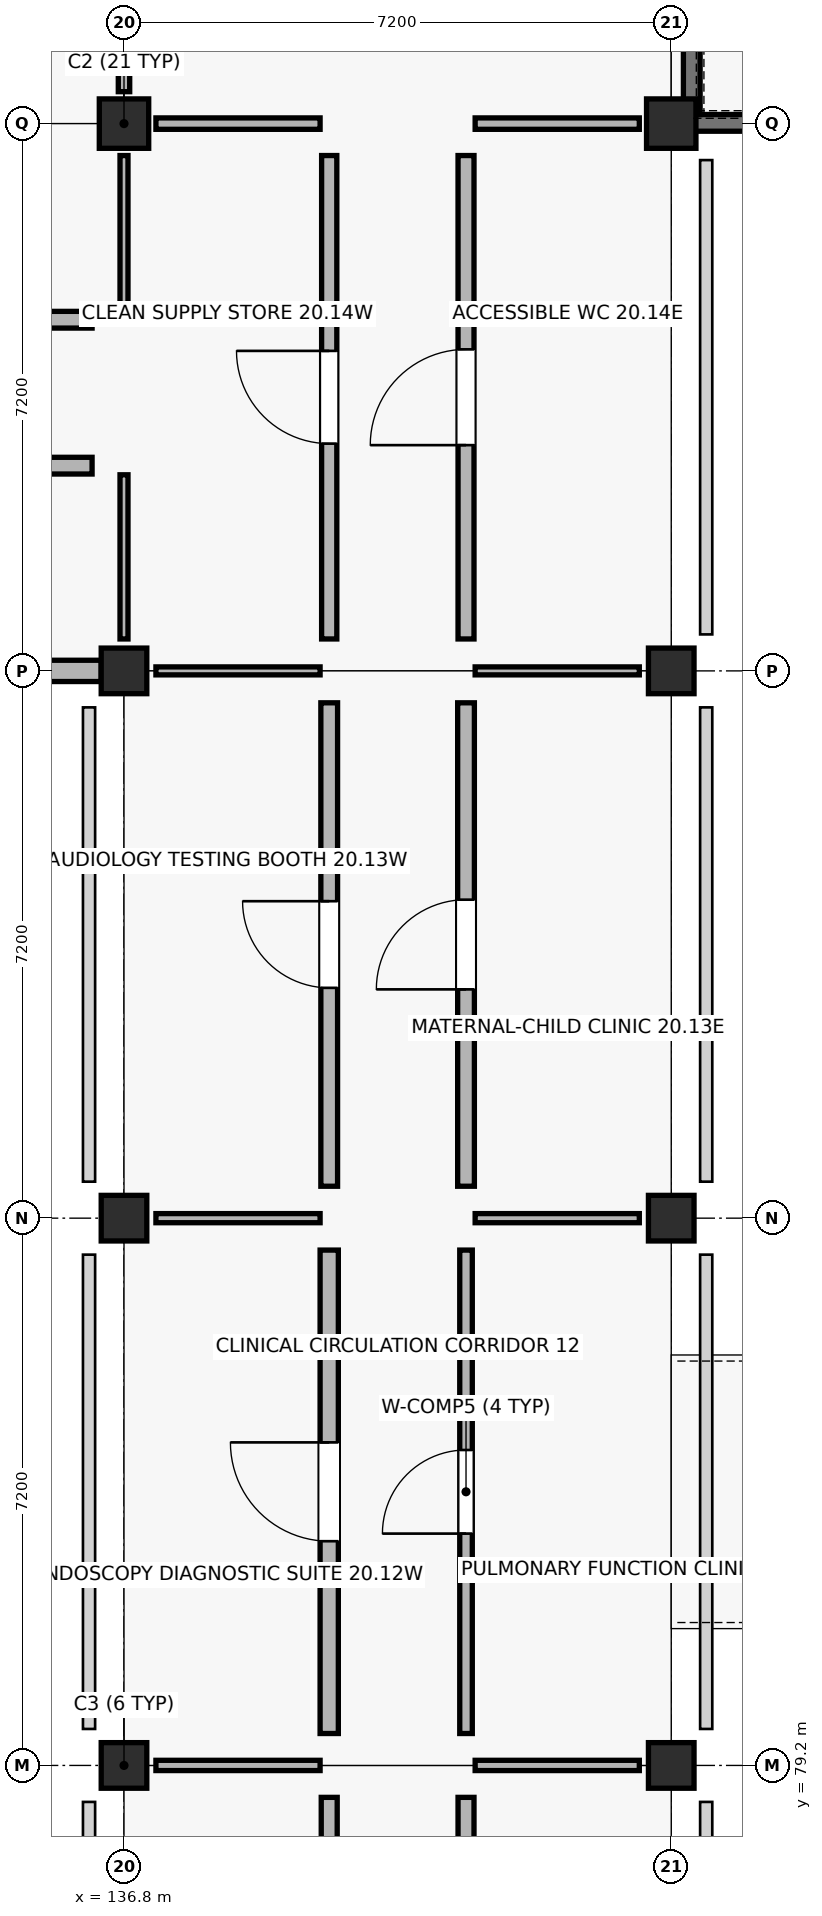
"""IFC4 building model, lengths in metres.
Left out: names, types, materials, properties, quantities, classifications, styles, units other than length and angle.
Written with IfcOpenShell. Run it as: python <this file> out.ifc"""

import sys

from ifc_helpers import new_model, si_unit, direction, frame, frame_2d, origin, origin_2d, place, context, subcontext, project, spatial, rectangle, extrude, element, fill, save


model = new_model("IFC4")
c1 = context("Model", 3, precision=1e-05, world=origin(), true_north=direction((0.0, 1.0)))
c2 = subcontext(c1, "Body", "Model", "MODEL_VIEW")
j1 = project(units=[si_unit("LENGTHUNIT", "METRE"), si_unit("PLANEANGLEUNIT", "RADIAN")], contexts=[c1])
p1 = place(None, origin())
s1 = spatial("IfcSite", under=j1, at=p1, CompositionType="ELEMENT")
p2 = place(p1, origin())
s2 = spatial("IfcBuilding", under=s1, at=p2, CompositionType="ELEMENT")
p3 = place(p2, frame((0.0, 0.0, 4.5)))
s3 = spatial("IfcBuildingStorey", under=s2, at=p3, CompositionType="ELEMENT", Elevation=4.5)
for number, where, z_axis, x_axis in (
    (1, (136.8, 79.2, 0.0), (0.0, 0.0, 1.0), (1.0, 0.0, 0.0)),
    (2, (136.8, 86.4, 0.0), (0.0, 0.0, 1.0), (1.0, 0.0, 0.0)),
    (3, (136.8, 93.6, 0.0), (0.0, 0.0, 1.0), (1.0, 0.0, 0.0)),
):
    element("IfcColumn", number, at=place(p3, frame(where, z_axis=z_axis, x_axis=x_axis)), inside=s3, PredefinedType="COLUMN", context=c2, shape_type="SweptSolid", body=[
        extrude(rectangle(XDim=0.6, YDim=0.6, at=origin_2d()), origin(), (0.0, 0.0, 1.0), 4.5),
    ])
p4 = place(p3, frame((136.8, 100.8, 0.0), z_axis=(0.0, 0.0, 1.0), x_axis=(1.0, 0.0, 0.0)))
e4 = element("IfcColumn", 4, at=p4, inside=s3, PredefinedType="COLUMN", context=c2, shape_type="SweptSolid", body=[
    extrude(rectangle(XDim=0.65, YDim=0.65, at=origin_2d()), origin(), (0.0, 0.0, 1.0), 4.5),
])
for number, where, z_axis, x_axis in (
    (5, (144.0, 79.2, 0.0), (0.0, 0.0, 1.0), (1.0, 0.0, 0.0)),
    (6, (144.0, 86.4, 0.0), (0.0, 0.0, 1.0), (1.0, 0.0, 0.0)),
    (7, (144.0, 93.6, 0.0), (0.0, 0.0, 1.0), (1.0, 0.0, 0.0)),
):
    element("IfcColumn", number, at=place(p3, frame(where, z_axis=z_axis, x_axis=x_axis)), inside=s3, PredefinedType="COLUMN", context=c2, shape_type="SweptSolid", body=[
        extrude(rectangle(XDim=0.6, YDim=0.6, at=origin_2d()), origin(), (0.0, 0.0, 1.0), 4.5),
    ])
p5 = place(p3, frame((144.0, 100.8, 0.0), z_axis=(0.0, 0.0, 1.0), x_axis=(1.0, 0.0, 0.0)))
e8 = element("IfcColumn", 8, at=p5, inside=s3, PredefinedType="COLUMN", context=c2, shape_type="SweptSolid", body=[
    extrude(rectangle(XDim=0.65, YDim=0.65, at=origin_2d()), origin(), (0.0, 0.0, 1.0), 4.5),
])
p6 = place(p3, frame((129.825, 93.6, 0.0), z_axis=(0.0, 0.0, 1.0), x_axis=(1.0, 0.0, 0.0)))
e9 = element("IfcWall", 9, at=p6, inside=s3, PredefinedType="STANDARD", context=c2, shape_type="SweptSolid", body=[
    extrude(rectangle(XDim=6.675, YDim=0.28, at=frame_2d((3.337, 0.0))), origin(), (0.0, 0.0, 1.0), 3.47),
])
p7 = place(p6, frame((0.85, 0.0, 0.9)))
e10 = element("IfcOpeningElement", 10, at=p7, cuts=e9, PredefinedType="OPENING", context=c2, shape_type="SweptSolid", body=[
    extrude(rectangle(XDim=1.8, YDim=1.5, at=frame_2d((0.9, 0.75))), frame((0.0, 0.15, 0.0), z_axis=(0.0, -1.0, 0.0), x_axis=(1.0, 0.0, 0.0)), (0.0, 0.0, 1.0), 0.3),
])
p8 = place(p6, frame((4.025, 0.0, 0.9)))
e11 = element("IfcOpeningElement", 11, at=p8, cuts=e9, PredefinedType="OPENING", context=c2, shape_type="SweptSolid", body=[
    extrude(rectangle(XDim=1.8, YDim=1.5, at=frame_2d((0.9, 0.75))), frame((0.0, 0.15, 0.0), z_axis=(0.0, -1.0, 0.0), x_axis=(1.0, 0.0, 0.0)), (0.0, 0.0, 1.0), 0.3),
])
p9 = place(p3, frame((144.16, 100.81, 0.0), z_axis=(0.0, 0.0, 1.0), x_axis=(1.0, 0.0, 0.0)))
e12 = element("IfcWall", 12, at=p9, inside=s3, PredefinedType="SHEAR", context=c2, shape_type="SweptSolid", body=[
    extrude(rectangle(XDim=6.88, YDim=0.22, at=frame_2d((3.44, 0.0))), origin(), (0.0, 0.0, 1.0), 4.22),
])
p10 = place(p3, frame((144.27, 100.92, 0.0), z_axis=(0.0, 0.0, 1.0), x_axis=(0.0, 1.0, 0.0)))
e13 = element("IfcWall", 13, at=p10, inside=s3, PredefinedType="SHEAR", context=c2, shape_type="SweptSolid", body=[
    extrude(rectangle(XDim=3.0, YDim=0.22, at=frame_2d((1.5, 0.0))), origin(), (0.0, 0.0, 1.0), 4.22),
])
p11 = place(p3, frame((130.02, 96.3, 0.0), z_axis=(0.0, 0.0, 1.0), x_axis=(1.0, 0.0, 0.0)))
e14 = element("IfcWall", 14, at=p11, inside=s3, PredefinedType="SOLIDWALL", context=c2, shape_type="SweptSolid", body=[
    extrude(rectangle(XDim=6.36, YDim=0.22, at=frame_2d((3.18, 0.0))), origin(), (0.0, 0.0, 1.0), 3.36),
])
p12 = place(p11, frame((2.55, 0.0, 0.0)))
e15 = element("IfcOpeningElement", 15, at=p12, cuts=e14, PredefinedType="OPENING", context=c2, shape_type="SweptSolid", body=[
    extrude(rectangle(XDim=1.26, YDim=2.09, at=frame_2d((0.63, 1.045))), frame((0.0, 0.12, 0.0), z_axis=(0.0, -1.0, 0.0), x_axis=(1.0, 0.0, 0.0)), (0.0, 0.0, 1.0), 0.24),
])
p13 = place(p3, frame((136.8, 94.02, 0.0), z_axis=(0.0, 0.0, 1.0), x_axis=(0.0, 1.0, 0.0)))
e16 = element("IfcWall", 16, at=p13, inside=s3, PredefinedType="PARTITIONING", context=c2, shape_type="SweptSolid", body=[
    extrude(rectangle(XDim=2.16, YDim=0.105, at=frame_2d((1.08, 0.0))), origin(), (0.0, 0.0, 1.0), 3.36),
])
p14 = place(p3, frame((130.02, 98.22, 0.0), z_axis=(0.0, 0.0, 1.0), x_axis=(1.0, 0.0, 0.0)))
e17 = element("IfcWall", 17, at=p14, inside=s3, PredefinedType="SOLIDWALL", context=c2, shape_type="SweptSolid", body=[
    extrude(rectangle(XDim=6.36, YDim=0.22, at=frame_2d((3.18, 0.0))), origin(), (0.0, 0.0, 1.0), 3.36),
])
p15 = place(p14, frame((2.53, 0.0, 0.0)))
e18 = element("IfcOpeningElement", 18, at=p15, cuts=e17, PredefinedType="OPENING", context=c2, shape_type="SweptSolid", body=[
    extrude(rectangle(XDim=1.3, YDim=2.09, at=frame_2d((0.65, 1.045))), frame((0.0, 0.12, 0.0), z_axis=(0.0, -1.0, 0.0), x_axis=(1.0, 0.0, 0.0)), (0.0, 0.0, 1.0), 0.24),
])
p16 = place(p3, frame((136.8, 98.34, 0.0), z_axis=(0.0, 0.0, 1.0), x_axis=(0.0, 1.0, 0.0)))
e19 = element("IfcWall", 19, at=p16, inside=s3, PredefinedType="PARTITIONING", context=c2, shape_type="SweptSolid", body=[
    extrude(rectangle(XDim=2.04, YDim=0.105, at=frame_2d((1.02, 0.0))), origin(), (0.0, 0.0, 1.0), 3.36),
])
p17 = place(p3, frame((136.8, 101.22, 0.0), z_axis=(0.0, 0.0, 1.0), x_axis=(0.0, 1.0, 0.0)))
e20 = element("IfcWall", 20, at=p17, inside=s3, PredefinedType="PARTITIONING", context=c2, shape_type="SweptSolid", body=[
    extrude(rectangle(XDim=2.16, YDim=0.15, at=frame_2d((1.08, 0.0))), origin(), (0.0, 0.0, 1.0), 3.36),
])
p18 = place(p3, frame((139.5, 72.42, 0.0), z_axis=(0.0, 0.0, 1.0), x_axis=(0.0, 1.0, 0.0)))
e21 = element("IfcWall", 21, at=p18, inside=s3, PredefinedType="PLUMBINGWALL", context=c2, shape_type="SweptSolid", body=[
    extrude(rectangle(XDim=6.36, YDim=0.21, at=frame_2d((3.18, 0.0))), origin(), (0.0, 0.0, 1.0), 3.36),
])
p19 = place(p18, frame((2.69, 0.0, 0.0)))
e22 = element("IfcOpeningElement", 22, at=p19, cuts=e21, PredefinedType="OPENING", context=c2, shape_type="SweptSolid", body=[
    extrude(rectangle(XDim=0.98, YDim=2.14, at=frame_2d((0.49, 1.07))), frame((0.0, 0.115, 0.0), z_axis=(0.0, -1.0, 0.0), x_axis=(1.0, 0.0, 0.0)), (0.0, 0.0, 1.0), 0.23),
])
p20 = place(p3, frame((137.22, 79.2, 0.0), z_axis=(0.0, 0.0, 1.0), x_axis=(1.0, 0.0, 0.0)))
e23 = element("IfcWall", 23, at=p20, inside=s3, PredefinedType="PARTITIONING", context=c2, shape_type="SweptSolid", body=[
    extrude(rectangle(XDim=2.16, YDim=0.135, at=frame_2d((1.08, 0.0))), origin(), (0.0, 0.0, 1.0), 3.36),
])
p21 = place(p3, frame((141.3, 72.42, 0.0), z_axis=(0.0, 0.0, 1.0), x_axis=(0.0, 1.0, 0.0)))
e24 = element("IfcWall", 24, at=p21, inside=s3, PredefinedType="PLUMBINGWALL", context=c2, shape_type="SweptSolid", body=[
    extrude(rectangle(XDim=6.36, YDim=0.21, at=frame_2d((3.18, 0.0))), origin(), (0.0, 0.0, 1.0), 3.36),
])
p22 = place(p21, frame((2.67, 0.0, 0.0)))
e25 = element("IfcOpeningElement", 25, at=p22, cuts=e24, PredefinedType="OPENING", context=c2, shape_type="SweptSolid", body=[
    extrude(rectangle(XDim=1.02, YDim=2.14, at=frame_2d((0.51, 1.07))), frame((0.0, 0.115, 0.0), z_axis=(0.0, -1.0, 0.0), x_axis=(1.0, 0.0, 0.0)), (0.0, 0.0, 1.0), 0.23),
])
p23 = place(p3, frame((141.42, 79.2, 0.0), z_axis=(0.0, 0.0, 1.0), x_axis=(1.0, 0.0, 0.0)))
e26 = element("IfcWall", 26, at=p23, inside=s3, PredefinedType="PARTITIONING", context=c2, shape_type="SweptSolid", body=[
    extrude(rectangle(XDim=2.16, YDim=0.135, at=frame_2d((1.08, 0.0))), origin(), (0.0, 0.0, 1.0), 3.36),
])
p24 = place(p3, frame((139.5, 79.62, 0.0), z_axis=(0.0, 0.0, 1.0), x_axis=(0.0, 1.0, 0.0)))
e27 = element("IfcWall", 27, at=p24, inside=s3, PredefinedType="SOLIDWALL", context=c2, shape_type="SweptSolid", body=[
    extrude(rectangle(XDim=6.36, YDim=0.24, at=frame_2d((3.18, 0.0))), origin(), (0.0, 0.0, 1.0), 3.36),
])
p25 = place(p24, frame((2.53, 0.0, 0.0)))
e28 = element("IfcOpeningElement", 28, at=p25, cuts=e27, PredefinedType="OPENING", context=c2, shape_type="SweptSolid", body=[
    extrude(rectangle(XDim=1.3, YDim=2.15, at=frame_2d((0.65, 1.075))), frame((0.0, 0.13, 0.0), z_axis=(0.0, -1.0, 0.0), x_axis=(1.0, 0.0, 0.0)), (0.0, 0.0, 1.0), 0.26),
])
p26 = place(p3, frame((137.22, 86.4, 0.0), z_axis=(0.0, 0.0, 1.0), x_axis=(1.0, 0.0, 0.0)))
e29 = element("IfcWall", 29, at=p26, inside=s3, PredefinedType="PARTITIONING", context=c2, shape_type="SweptSolid", body=[
    extrude(rectangle(XDim=2.16, YDim=0.12, at=frame_2d((1.08, 0.0))), origin(), (0.0, 0.0, 1.0), 3.36),
])
p27 = place(p3, frame((141.3, 79.62, 0.0), z_axis=(0.0, 0.0, 1.0), x_axis=(0.0, 1.0, 0.0)))
e30 = element("IfcWall", 30, at=p27, inside=s3, PredefinedType="PARTITIONING", context=c2, shape_type="SweptSolid", body=[
    extrude(rectangle(XDim=6.36, YDim=0.165, at=frame_2d((3.18, 0.0))), origin(), (0.0, 0.0, 1.0), 3.36),
])
p28 = place(p27, frame((2.63, 0.0, 0.0)))
e31 = element("IfcOpeningElement", 31, at=p28, cuts=e30, PredefinedType="OPENING", context=c2, shape_type="SweptSolid", body=[
    extrude(rectangle(XDim=1.1, YDim=2.14, at=frame_2d((0.55, 1.07))), frame((0.0, 0.093, 0.0), z_axis=(0.0, -1.0, 0.0), x_axis=(1.0, 0.0, 0.0)), (0.0, 0.0, 1.0), 0.185),
])
p29 = place(p3, frame((141.42, 86.4, 0.0), z_axis=(0.0, 0.0, 1.0), x_axis=(1.0, 0.0, 0.0)))
e32 = element("IfcWall", 32, at=p29, inside=s3, PredefinedType="PARTITIONING", context=c2, shape_type="SweptSolid", body=[
    extrude(rectangle(XDim=2.16, YDim=0.12, at=frame_2d((1.08, 0.0))), origin(), (0.0, 0.0, 1.0), 3.36),
])
p30 = place(p3, frame((139.5, 86.82, 0.0), z_axis=(0.0, 0.0, 1.0), x_axis=(0.0, 1.0, 0.0)))
e33 = element("IfcWall", 33, at=p30, inside=s3, PredefinedType="SOLIDWALL", context=c2, shape_type="SweptSolid", body=[
    extrude(rectangle(XDim=6.36, YDim=0.22, at=frame_2d((3.18, 0.0))), origin(), (0.0, 0.0, 1.0), 3.36),
])
p31 = place(p30, frame((2.61, 0.0, 0.0)))
e34 = element("IfcOpeningElement", 34, at=p31, cuts=e33, PredefinedType="OPENING", context=c2, shape_type="SweptSolid", body=[
    extrude(rectangle(XDim=1.14, YDim=2.14, at=frame_2d((0.57, 1.07))), frame((0.0, 0.12, 0.0), z_axis=(0.0, -1.0, 0.0), x_axis=(1.0, 0.0, 0.0)), (0.0, 0.0, 1.0), 0.24),
])
p32 = place(p3, frame((137.22, 93.6, 0.0), z_axis=(0.0, 0.0, 1.0), x_axis=(1.0, 0.0, 0.0)))
e35 = element("IfcWall", 35, at=p32, inside=s3, PredefinedType="PARTITIONING", context=c2, shape_type="SweptSolid", body=[
    extrude(rectangle(XDim=2.16, YDim=0.105, at=frame_2d((1.08, 0.0))), origin(), (0.0, 0.0, 1.0), 3.36),
])
p33 = place(p3, frame((141.3, 86.82, 0.0), z_axis=(0.0, 0.0, 1.0), x_axis=(0.0, 1.0, 0.0)))
e36 = element("IfcWall", 36, at=p33, inside=s3, PredefinedType="SOLIDWALL", context=c2, shape_type="SweptSolid", body=[
    extrude(rectangle(XDim=6.36, YDim=0.22, at=frame_2d((3.18, 0.0))), origin(), (0.0, 0.0, 1.0), 3.36),
])
p34 = place(p33, frame((2.59, 0.0, 0.0)))
e37 = element("IfcOpeningElement", 37, at=p34, cuts=e36, PredefinedType="OPENING", context=c2, shape_type="SweptSolid", body=[
    extrude(rectangle(XDim=1.18, YDim=2.14, at=frame_2d((0.59, 1.07))), frame((0.0, 0.12, 0.0), z_axis=(0.0, -1.0, 0.0), x_axis=(1.0, 0.0, 0.0)), (0.0, 0.0, 1.0), 0.24),
])
p35 = place(p3, frame((141.42, 93.6, 0.0), z_axis=(0.0, 0.0, 1.0), x_axis=(1.0, 0.0, 0.0)))
e38 = element("IfcWall", 38, at=p35, inside=s3, PredefinedType="PARTITIONING", context=c2, shape_type="SweptSolid", body=[
    extrude(rectangle(XDim=2.16, YDim=0.105, at=frame_2d((1.08, 0.0))), origin(), (0.0, 0.0, 1.0), 3.36),
])
p36 = place(p3, frame((139.5, 94.02, 0.0), z_axis=(0.0, 0.0, 1.0), x_axis=(0.0, 1.0, 0.0)))
e39 = element("IfcWall", 39, at=p36, inside=s3, PredefinedType="SOLIDWALL", context=c2, shape_type="SweptSolid", body=[
    extrude(rectangle(XDim=6.36, YDim=0.2, at=frame_2d((3.18, 0.0))), origin(), (0.0, 0.0, 1.0), 3.36),
])
p37 = place(p36, frame((2.57, 0.0, 0.0)))
e40 = element("IfcOpeningElement", 40, at=p37, cuts=e39, PredefinedType="OPENING", context=c2, shape_type="SweptSolid", body=[
    extrude(rectangle(XDim=1.22, YDim=2.14, at=frame_2d((0.61, 1.07))), frame((0.0, 0.11, 0.0), z_axis=(0.0, -1.0, 0.0), x_axis=(1.0, 0.0, 0.0)), (0.0, 0.0, 1.0), 0.22),
])
p38 = place(p3, frame((137.22, 100.8, 0.0), z_axis=(0.0, 0.0, 1.0), x_axis=(1.0, 0.0, 0.0)))
e41 = element("IfcWall", 41, at=p38, inside=s3, PredefinedType="PARTITIONING", context=c2, shape_type="SweptSolid", body=[
    extrude(rectangle(XDim=2.16, YDim=0.15, at=frame_2d((1.08, 0.0))), origin(), (0.0, 0.0, 1.0), 3.36),
])
p39 = place(p3, frame((141.3, 94.02, 0.0), z_axis=(0.0, 0.0, 1.0), x_axis=(0.0, 1.0, 0.0)))
e42 = element("IfcWall", 42, at=p39, inside=s3, PredefinedType="PLUMBINGWALL", context=c2, shape_type="SweptSolid", body=[
    extrude(rectangle(XDim=6.36, YDim=0.21, at=frame_2d((3.18, 0.0))), origin(), (0.0, 0.0, 1.0), 3.36),
])
p40 = place(p39, frame((2.55, 0.0, 0.0)))
e43 = element("IfcOpeningElement", 43, at=p40, cuts=e42, PredefinedType="OPENING", context=c2, shape_type="SweptSolid", body=[
    extrude(rectangle(XDim=1.26, YDim=2.14, at=frame_2d((0.63, 1.07))), frame((0.0, 0.115, 0.0), z_axis=(0.0, -1.0, 0.0), x_axis=(1.0, 0.0, 0.0)), (0.0, 0.0, 1.0), 0.23),
])
p41 = place(p3, frame((141.42, 100.8, 0.0), z_axis=(0.0, 0.0, 1.0), x_axis=(1.0, 0.0, 0.0)))
e44 = element("IfcWall", 44, at=p41, inside=s3, PredefinedType="PARTITIONING", context=c2, shape_type="SweptSolid", body=[
    extrude(rectangle(XDim=2.16, YDim=0.15, at=frame_2d((1.08, 0.0))), origin(), (0.0, 0.0, 1.0), 3.36),
])
p42 = place(p25, origin())
e45 = element("IfcDoor", 45, at=p42, inside=s3, OperationType="SINGLE_SWING_RIGHT", PredefinedType="DOOR", context=c2, shape_type="SweptSolid", body=[
    extrude(rectangle(XDim=1.3, YDim=2.15, at=frame_2d((0.65, 1.075))), frame((0.0, 0.025, 0.0), z_axis=(0.0, -1.0, 0.0), x_axis=(1.0, 0.0, 0.0)), (0.0, 0.0, 1.0), 0.05),
])
fill(e28, e45)
p43 = place(p28, origin())
e46 = element("IfcDoor", 46, at=p43, inside=s3, OperationType="SINGLE_SWING_LEFT", PredefinedType="DOOR", context=c2, shape_type="SweptSolid", body=[
    extrude(rectangle(XDim=1.1, YDim=2.14, at=frame_2d((0.55, 1.07))), frame((0.0, 0.025, 0.0), z_axis=(0.0, -1.0, 0.0), x_axis=(1.0, 0.0, 0.0)), (0.0, 0.0, 1.0), 0.05),
])
fill(e31, e46)
p44 = place(p31, origin())
e47 = element("IfcDoor", 47, at=p44, inside=s3, OperationType="SINGLE_SWING_RIGHT", PredefinedType="DOOR", context=c2, shape_type="SweptSolid", body=[
    extrude(rectangle(XDim=1.14, YDim=2.14, at=frame_2d((0.57, 1.07))), frame((0.0, 0.025, 0.0), z_axis=(0.0, -1.0, 0.0), x_axis=(1.0, 0.0, 0.0)), (0.0, 0.0, 1.0), 0.05),
])
fill(e34, e47)
p45 = place(p34, origin())
e48 = element("IfcDoor", 48, at=p45, inside=s3, OperationType="SINGLE_SWING_LEFT", PredefinedType="DOOR", context=c2, shape_type="SweptSolid", body=[
    extrude(rectangle(XDim=1.18, YDim=2.14, at=frame_2d((0.59, 1.07))), frame((0.0, 0.025, 0.0), z_axis=(0.0, -1.0, 0.0), x_axis=(1.0, 0.0, 0.0)), (0.0, 0.0, 1.0), 0.05),
])
fill(e37, e48)
p46 = place(p37, origin())
e49 = element("IfcDoor", 49, at=p46, inside=s3, OperationType="SINGLE_SWING_RIGHT", PredefinedType="DOOR", context=c2, shape_type="SweptSolid", body=[
    extrude(rectangle(XDim=1.22, YDim=2.14, at=frame_2d((0.61, 1.07))), frame((0.0, 0.025, 0.0), z_axis=(0.0, -1.0, 0.0), x_axis=(1.0, 0.0, 0.0)), (0.0, 0.0, 1.0), 0.05),
])
fill(e40, e49)
p47 = place(p40, origin())
e50 = element("IfcDoor", 50, at=p47, inside=s3, OperationType="SINGLE_SWING_LEFT", PredefinedType="DOOR", context=c2, shape_type="SweptSolid", body=[
    extrude(rectangle(XDim=1.26, YDim=2.14, at=frame_2d((0.63, 1.07))), frame((0.0, 0.025, 0.0), z_axis=(0.0, -1.0, 0.0), x_axis=(1.0, 0.0, 0.0)), (0.0, 0.0, 1.0), 0.05),
])
fill(e43, e50)
save(model, sys.argv[1])
